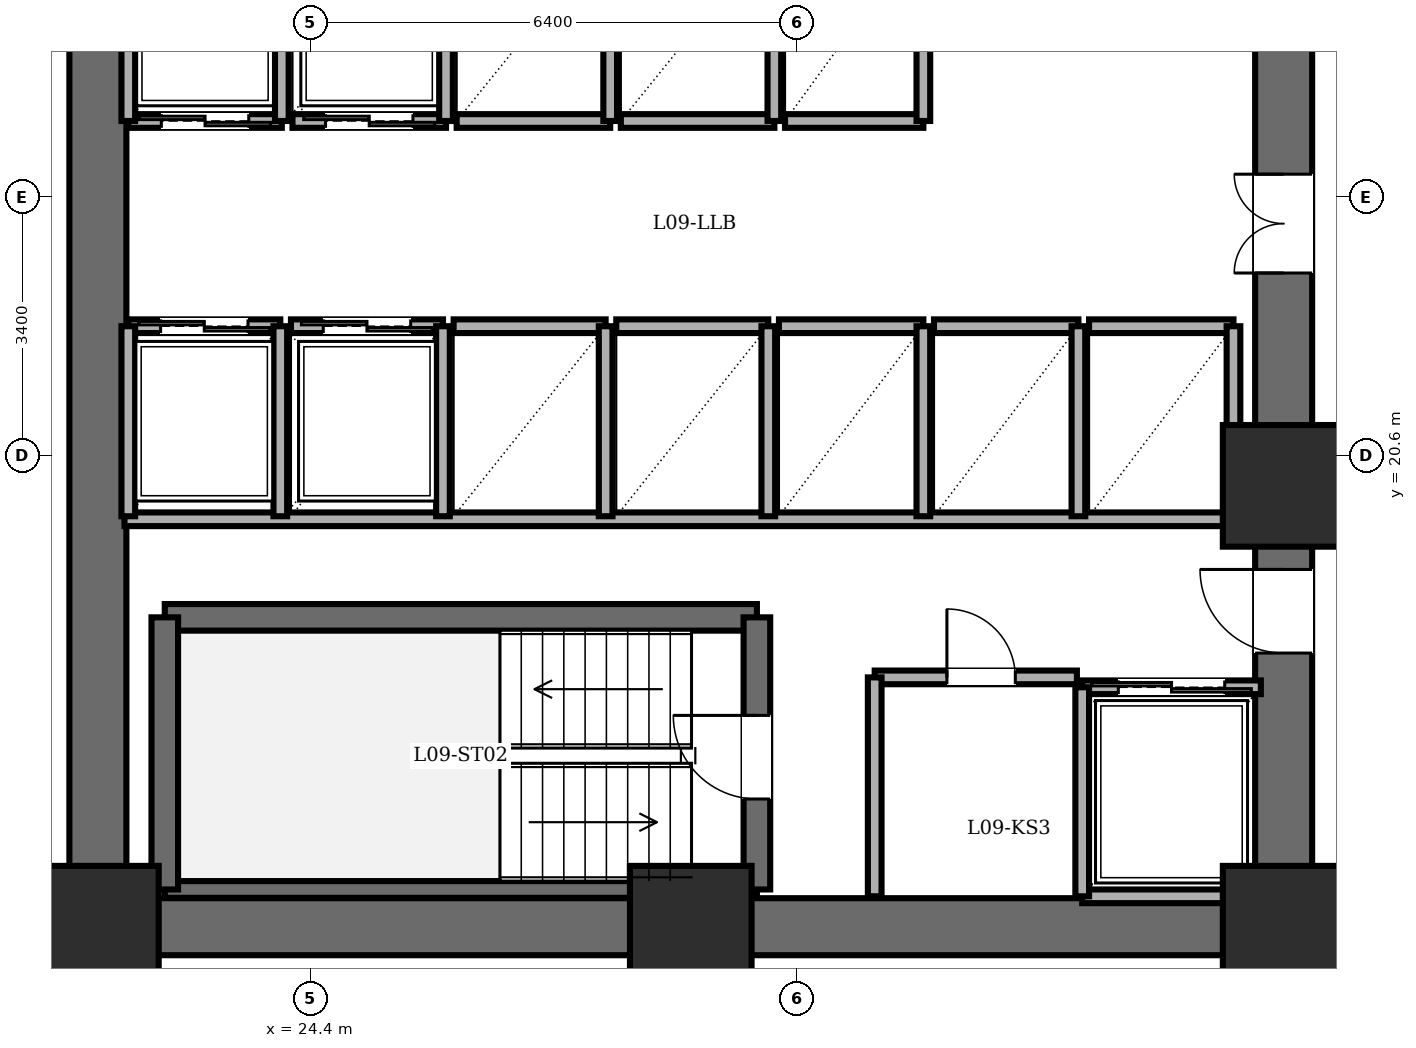
"""IFC4 building model, lengths in metres.
Left out: names, types, materials, properties, quantities, classifications, styles, units other than length and angle.
Written with IfcOpenShell. Run it as: python <this file> out.ifc"""

import sys

from ifc_helpers import new_model, si_unit, direction, frame, frame_2d, origin, origin_2d, place, context, subcontext, project, spatial, rectangle, extrude, element, fill, save


model = new_model("IFC4")
c1 = context("Model", 3, precision=1e-05, world=origin(), true_north=direction((0.0, 1.0)))
c2 = subcontext(c1, "Body", "Model", "MODEL_VIEW")
j1 = project(units=[si_unit("LENGTHUNIT", "METRE"), si_unit("PLANEANGLEUNIT", "RADIAN")], contexts=[c1])
p1 = place(None, origin())
s1 = spatial("IfcSite", under=j1, at=p1, CompositionType="ELEMENT")
p2 = place(p1, origin())
s2 = spatial("IfcBuilding", under=s1, at=p2, CompositionType="ELEMENT")
p3 = place(p2, frame((0.0, 0.0, 36.0)))
s3 = spatial("IfcBuildingStorey", under=s2, at=p3, CompositionType="ELEMENT", Elevation=36.0)
for number, where, z_axis, x_axis in (
    (1, (21.6, 14.4, 0.0), (0.0, 0.0, 1.0), (1.0, 0.0, 0.0)),
    (2, (29.4, 14.4, 0.0), (0.0, 0.0, 1.0), (1.0, 0.0, 0.0)),
    (3, (37.2, 14.4, 0.0), (0.0, 0.0, 1.0), (1.0, 0.0, 0.0)),
    (4, (37.2, 20.2, 0.0), (0.0, 0.0, 1.0), (1.0, 0.0, 0.0)),
):
    element("IfcColumn", number, at=place(p3, frame(where, z_axis=z_axis, x_axis=x_axis)), inside=s3, PredefinedType="COLUMN", context=c2, shape_type="SweptSolid", body=[
        extrude(rectangle(XDim=1.6, YDim=1.6, at=origin_2d()), origin(), (0.0, 0.0, 1.0), 3.6),
    ])
p4 = place(p3, frame((21.6, 14.4, 0.0), z_axis=(0.0, 0.0, 1.0), x_axis=(0.0, 1.0, 0.0)))
e5 = element("IfcWall", 5, at=p4, inside=s3, PredefinedType="SHEAR", context=c2, shape_type="SweptSolid", body=[
    extrude(rectangle(XDim=19.2, YDim=0.75, at=frame_2d((9.6, 0.0))), origin(), (0.0, 0.0, 1.0), 3.4),
])
p5 = place(p3, frame((37.2, 14.4, 0.0), z_axis=(0.0, 0.0, 1.0), x_axis=(-1.0, 0.0, 0.0)))
e6 = element("IfcWall", 6, at=p5, inside=s3, PredefinedType="SHEAR", context=c2, shape_type="SweptSolid", body=[
    extrude(rectangle(XDim=15.6, YDim=0.75, at=frame_2d((7.8, 0.0))), origin(), (0.0, 0.0, 1.0), 3.4),
])
p6 = place(p3, frame((37.2, 14.4, 0.0), z_axis=(0.0, 0.0, 1.0), x_axis=(0.0, 1.0, 0.0)))
e7 = element("IfcWall", 7, at=p6, inside=s3, PredefinedType="SHEAR", context=c2, shape_type="SweptSolid", body=[
    extrude(rectangle(XDim=19.2, YDim=0.75, at=frame_2d((9.6, 0.0))), origin(), (0.0, 0.0, 1.0), 3.4),
])
p7 = place(p6, frame((15.8, 0.0, 0.0)))
e8 = element("IfcOpeningElement", 8, at=p7, cuts=e7, PredefinedType="OPENING", context=c2, shape_type="SweptSolid", body=[
    extrude(rectangle(XDim=1.15, YDim=2.15, at=frame_2d((0.575, 1.075))), frame((0.0, 0.385, 0.0), z_axis=(0.0, -1.0, 0.0), x_axis=(1.0, 0.0, 0.0)), (0.0, 0.0, 1.0), 0.77),
])
p8 = place(p6, frame((3.6, 0.0, 0.0)))
e9 = element("IfcOpeningElement", 9, at=p8, cuts=e7, PredefinedType="OPENING", context=c2, shape_type="SweptSolid", body=[
    extrude(rectangle(XDim=1.1, YDim=2.15, at=frame_2d((0.55, 1.075))), frame((0.0, 0.385, 0.0), z_axis=(0.0, -1.0, 0.0), x_axis=(1.0, 0.0, 0.0)), (0.0, 0.0, 1.0), 0.77),
])
p9 = place(p6, frame((8.6, 0.0, 0.0)))
e10 = element("IfcOpeningElement", 10, at=p9, cuts=e7, PredefinedType="OPENING", context=c2, shape_type="SweptSolid", body=[
    extrude(rectangle(XDim=1.3, YDim=2.2, at=frame_2d((0.65, 1.1))), frame((0.0, 0.385, 0.0), z_axis=(0.0, -1.0, 0.0), x_axis=(1.0, 0.0, 0.0)), (0.0, 0.0, 1.0), 0.77),
])
p10 = place(p3, frame((22.48, 18.47, 0.0), z_axis=(0.0, 0.0, 1.0), x_axis=(1.0, 0.0, 0.0)))
e11 = element("IfcWall", 11, at=p10, inside=s3, PredefinedType="SOLIDWALL", context=c2, shape_type="SweptSolid", body=[
    extrude(rectangle(XDim=7.79, YDim=0.35, at=frame_2d((3.895, 0.0))), origin(), (0.0, 0.0, 1.0), 3.4),
])
p11 = place(p3, frame((22.48, 14.89, 0.0), z_axis=(0.0, 0.0, 1.0), x_axis=(1.0, 0.0, 0.0)))
e12 = element("IfcWall", 12, at=p11, inside=s3, PredefinedType="PARTITIONING", context=c2, shape_type="SweptSolid", body=[
    extrude(rectangle(XDim=7.79, YDim=0.22, at=frame_2d((3.895, 0.0))), origin(), (0.0, 0.0, 1.0), 3.4),
])
p12 = place(p3, frame((22.48, 14.89, 0.0), z_axis=(0.0, 0.0, 1.0), x_axis=(0.0, 1.0, 0.0)))
e13 = element("IfcWall", 13, at=p12, inside=s3, PredefinedType="SOLIDWALL", context=c2, shape_type="SweptSolid", body=[
    extrude(rectangle(XDim=3.58, YDim=0.35, at=frame_2d((1.79, 0.0))), origin(), (0.0, 0.0, 1.0), 3.4),
])
p13 = place(p3, frame((30.27, 14.89, 0.0), z_axis=(0.0, 0.0, 1.0), x_axis=(0.0, 1.0, 0.0)))
e14 = element("IfcWall", 14, at=p13, inside=s3, PredefinedType="SOLIDWALL", context=c2, shape_type="SweptSolid", body=[
    extrude(rectangle(XDim=3.58, YDim=0.35, at=frame_2d((1.79, 0.0))), origin(), (0.0, 0.0, 1.0), 3.4),
])
p14 = place(p13, frame((1.19, 0.0, 0.0)))
e15 = element("IfcOpeningElement", 15, at=p14, cuts=e14, PredefinedType="OPENING", context=c2, shape_type="SweptSolid", body=[
    extrude(rectangle(XDim=1.1, YDim=2.15, at=frame_2d((0.55, 1.075))), frame((0.0, 0.185, 0.0), z_axis=(0.0, -1.0, 0.0), x_axis=(1.0, 0.0, 0.0)), (0.0, 0.0, 1.0), 0.37),
])
p15 = place(p3, frame((21.95, 19.76, 0.0), z_axis=(0.0, 0.0, 1.0), x_axis=(1.0, 0.0, 0.0)))
e16 = element("IfcWall", 16, at=p15, inside=s3, PredefinedType="PARTITIONING", context=c2, shape_type="SweptSolid", body=[
    extrude(rectangle(XDim=14.87, YDim=0.18, at=frame_2d((7.435, 0.0))), origin(), (0.0, 0.0, 1.0), 3.4),
])
p16 = place(p3, frame((31.82, 17.68, 0.0), z_axis=(0.0, 0.0, 1.0), x_axis=(1.0, 0.0, 0.0)))
e17 = element("IfcWall", 17, at=p16, inside=s3, PredefinedType="PARTITIONING", context=c2, shape_type="SweptSolid", body=[
    extrude(rectangle(XDim=2.66, YDim=0.18, at=frame_2d((1.33, 0.0))), origin(), (0.0, 0.0, 1.0), 3.4),
])
p17 = place(p16, frame((0.95, 0.0, 0.0)))
e18 = element("IfcOpeningElement", 18, at=p17, cuts=e17, PredefinedType="OPENING", context=c2, shape_type="SweptSolid", body=[
    extrude(rectangle(XDim=0.9, YDim=2.05, at=frame_2d((0.45, 1.025))), frame((0.0, 0.1, 0.0), z_axis=(0.0, -1.0, 0.0), x_axis=(1.0, 0.0, 0.0)), (0.0, 0.0, 1.0), 0.2),
])
p18 = place(p3, frame((31.82, 14.8, 0.0), z_axis=(0.0, 0.0, 1.0), x_axis=(0.0, 1.0, 0.0)))
e19 = element("IfcWall", 19, at=p18, inside=s3, PredefinedType="PARTITIONING", context=c2, shape_type="SweptSolid", body=[
    extrude(rectangle(XDim=2.88, YDim=0.18, at=frame_2d((1.44, 0.0))), origin(), (0.0, 0.0, 1.0), 3.4),
])
p19 = place(p3, frame((34.55, 17.55, 0.0), z_axis=(0.0, 0.0, 1.0), x_axis=(1.0, 0.0, 0.0)))
e20 = element("IfcWall", 20, at=p19, inside=s3, PredefinedType="PARTITIONING", context=c2, shape_type="SweptSolid", body=[
    extrude(rectangle(XDim=2.35, YDim=0.18, at=frame_2d((1.175, 0.0))), origin(), (0.0, 0.0, 1.0), 3.4),
])
p20 = place(p19, frame((0.475, 0.0, 0.0)))
e21 = element("IfcOpeningElement", 21, at=p20, cuts=e20, PredefinedType="OPENING", context=c2, shape_type="SweptSolid", body=[
    extrude(rectangle(XDim=1.4, YDim=2.3, at=frame_2d((0.7, 1.15))), frame((0.0, 0.1, 0.0), z_axis=(0.0, -1.0, 0.0), x_axis=(1.0, 0.0, 0.0)), (0.0, 0.0, 1.0), 0.2),
])
p21 = place(p3, frame((36.9, 14.8, 0.0), z_axis=(0.0, 0.0, 1.0), x_axis=(-1.0, 0.0, 0.0)))
e22 = element("IfcWall", 22, at=p21, inside=s3, PredefinedType="PARTITIONING", context=c2, shape_type="SweptSolid", body=[
    extrude(rectangle(XDim=2.35, YDim=0.18, at=frame_2d((1.175, 0.0))), origin(), (0.0, 0.0, 1.0), 3.4),
])
p22 = place(p3, frame((34.55, 17.55, 0.0), z_axis=(0.0, 0.0, 1.0), x_axis=(0.0, -1.0, 0.0)))
e23 = element("IfcWall", 23, at=p22, inside=s3, PredefinedType="PARTITIONING", context=c2, shape_type="SweptSolid", body=[
    extrude(rectangle(XDim=2.75, YDim=0.18, at=frame_2d((1.375, 0.0))), origin(), (0.0, 0.0, 1.0), 3.4),
])
p23 = place(p3, frame((24.02, 25.0, 0.0), z_axis=(0.0, 0.0, 1.0), x_axis=(-1.0, 0.0, 0.0)))
e24 = element("IfcWall", 24, at=p23, inside=s3, PredefinedType="PARTITIONING", context=c2, shape_type="SweptSolid", body=[
    extrude(rectangle(XDim=2.02, YDim=0.18, at=frame_2d((1.01, 0.0))), origin(), (0.0, 0.0, 1.0), 3.4),
])
p24 = place(p23, frame((0.435, 0.0, 0.0)))
e25 = element("IfcOpeningElement", 25, at=p24, cuts=e24, PredefinedType="OPENING", context=c2, shape_type="SweptSolid", body=[
    extrude(rectangle(XDim=1.15, YDim=2.2, at=frame_2d((0.575, 1.1))), frame((0.0, 0.1, 0.0), z_axis=(0.0, -1.0, 0.0), x_axis=(1.0, 0.0, 0.0)), (0.0, 0.0, 1.0), 0.2),
])
for number, where, z_axis, x_axis in (
    (26, (24.02, 25.0, 0.0), (0.0, 0.0, 1.0), (0.0, 1.0, 0.0)),
    (27, (22.0, 27.5, 0.0), (0.0, 0.0, 1.0), (0.0, -1.0, 0.0)),
):
    element("IfcWall", number, at=place(p3, frame(where, z_axis=z_axis, x_axis=x_axis)), inside=s3, PredefinedType="PARTITIONING", context=c2, shape_type="SweptSolid", body=[
        extrude(rectangle(XDim=2.5, YDim=0.18, at=frame_2d((1.25, 0.0))), origin(), (0.0, 0.0, 1.0), 3.4),
    ])
p25 = place(p3, frame((26.18, 25.0, 0.0), z_axis=(0.0, 0.0, 1.0), x_axis=(-1.0, 0.0, 0.0)))
e28 = element("IfcWall", 28, at=p25, inside=s3, PredefinedType="PARTITIONING", context=c2, shape_type="SweptSolid", body=[
    extrude(rectangle(XDim=2.02, YDim=0.18, at=frame_2d((1.01, 0.0))), origin(), (0.0, 0.0, 1.0), 3.4),
])
p26 = place(p25, frame((0.435, 0.0, 0.0)))
e29 = element("IfcOpeningElement", 29, at=p26, cuts=e28, PredefinedType="OPENING", context=c2, shape_type="SweptSolid", body=[
    extrude(rectangle(XDim=1.15, YDim=2.2, at=frame_2d((0.575, 1.1))), frame((0.0, 0.1, 0.0), z_axis=(0.0, -1.0, 0.0), x_axis=(1.0, 0.0, 0.0)), (0.0, 0.0, 1.0), 0.2),
])
p27 = place(p3, frame((26.18, 25.0, 0.0), z_axis=(0.0, 0.0, 1.0), x_axis=(0.0, 1.0, 0.0)))
e30 = element("IfcWall", 30, at=p27, inside=s3, PredefinedType="PARTITIONING", context=c2, shape_type="SweptSolid", body=[
    extrude(rectangle(XDim=2.5, YDim=0.18, at=frame_2d((1.25, 0.0))), origin(), (0.0, 0.0, 1.0), 3.4),
])
p28 = place(p3, frame((22.0, 22.3, 0.0), z_axis=(0.0, 0.0, 1.0), x_axis=(1.0, 0.0, 0.0)))
e31 = element("IfcWall", 31, at=p28, inside=s3, PredefinedType="PARTITIONING", context=c2, shape_type="SweptSolid", body=[
    extrude(rectangle(XDim=2.0, YDim=0.18, at=frame_2d((1.0, 0.0))), origin(), (0.0, 0.0, 1.0), 3.4),
])
p29 = place(p28, frame((0.425, 0.0, 0.0)))
e32 = element("IfcOpeningElement", 32, at=p29, cuts=e31, PredefinedType="OPENING", context=c2, shape_type="SweptSolid", body=[
    extrude(rectangle(XDim=1.15, YDim=2.2, at=frame_2d((0.575, 1.1))), frame((0.0, 0.1, 0.0), z_axis=(0.0, -1.0, 0.0), x_axis=(1.0, 0.0, 0.0)), (0.0, 0.0, 1.0), 0.2),
])
for number, where, z_axis, x_axis in (
    (33, (24.0, 19.8, 0.0), (0.0, 0.0, 1.0), (0.0, 1.0, 0.0)),
    (34, (22.0, 22.3, 0.0), (0.0, 0.0, 1.0), (0.0, -1.0, 0.0)),
):
    element("IfcWall", number, at=place(p3, frame(where, z_axis=z_axis, x_axis=x_axis)), inside=s3, PredefinedType="PARTITIONING", context=c2, shape_type="SweptSolid", body=[
        extrude(rectangle(XDim=2.5, YDim=0.18, at=frame_2d((1.25, 0.0))), origin(), (0.0, 0.0, 1.0), 3.4),
    ])
p30 = place(p3, frame((24.14, 22.3, 0.0), z_axis=(0.0, 0.0, 1.0), x_axis=(1.0, 0.0, 0.0)))
e35 = element("IfcWall", 35, at=p30, inside=s3, PredefinedType="PARTITIONING", context=c2, shape_type="SweptSolid", body=[
    extrude(rectangle(XDim=2.0, YDim=0.18, at=frame_2d((1.0, 0.0))), origin(), (0.0, 0.0, 1.0), 3.4),
])
p31 = place(p30, frame((0.425, 0.0, 0.0)))
e36 = element("IfcOpeningElement", 36, at=p31, cuts=e35, PredefinedType="OPENING", context=c2, shape_type="SweptSolid", body=[
    extrude(rectangle(XDim=1.15, YDim=2.2, at=frame_2d((0.575, 1.1))), frame((0.0, 0.1, 0.0), z_axis=(0.0, -1.0, 0.0), x_axis=(1.0, 0.0, 0.0)), (0.0, 0.0, 1.0), 0.2),
])
p32 = place(p3, frame((26.14, 19.8, 0.0), z_axis=(0.0, 0.0, 1.0), x_axis=(0.0, 1.0, 0.0)))
e37 = element("IfcWall", 37, at=p32, inside=s3, PredefinedType="PARTITIONING", context=c2, shape_type="SweptSolid", body=[
    extrude(rectangle(XDim=2.5, YDim=0.18, at=frame_2d((1.25, 0.0))), origin(), (0.0, 0.0, 1.0), 3.4),
])
p33 = place(p3, frame((28.34, 25.0, 0.0), z_axis=(0.0, 0.0, 1.0), x_axis=(-1.0, 0.0, 0.0)))
e38 = element("IfcWall", 38, at=p33, inside=s3, PredefinedType="PARTITIONING", context=c2, shape_type="SweptSolid", body=[
    extrude(rectangle(XDim=2.02, YDim=0.18, at=frame_2d((1.01, 0.0))), origin(), (0.0, 0.0, 1.0), 3.4),
])
p34 = place(p3, frame((28.34, 25.0, 0.0), z_axis=(0.0, 0.0, 1.0), x_axis=(0.0, 1.0, 0.0)))
e39 = element("IfcWall", 39, at=p34, inside=s3, PredefinedType="PARTITIONING", context=c2, shape_type="SweptSolid", body=[
    extrude(rectangle(XDim=2.5, YDim=0.18, at=frame_2d((1.25, 0.0))), origin(), (0.0, 0.0, 1.0), 3.4),
])
p35 = place(p3, frame((30.5, 25.0, 0.0), z_axis=(0.0, 0.0, 1.0), x_axis=(-1.0, 0.0, 0.0)))
e40 = element("IfcWall", 40, at=p35, inside=s3, PredefinedType="PARTITIONING", context=c2, shape_type="SweptSolid", body=[
    extrude(rectangle(XDim=2.02, YDim=0.18, at=frame_2d((1.01, 0.0))), origin(), (0.0, 0.0, 1.0), 3.4),
])
p36 = place(p3, frame((30.5, 25.0, 0.0), z_axis=(0.0, 0.0, 1.0), x_axis=(0.0, 1.0, 0.0)))
e41 = element("IfcWall", 41, at=p36, inside=s3, PredefinedType="PARTITIONING", context=c2, shape_type="SweptSolid", body=[
    extrude(rectangle(XDim=2.5, YDim=0.18, at=frame_2d((1.25, 0.0))), origin(), (0.0, 0.0, 1.0), 3.4),
])
p37 = place(p3, frame((26.28, 22.3, 0.0), z_axis=(0.0, 0.0, 1.0), x_axis=(1.0, 0.0, 0.0)))
e42 = element("IfcWall", 42, at=p37, inside=s3, PredefinedType="PARTITIONING", context=c2, shape_type="SweptSolid", body=[
    extrude(rectangle(XDim=2.0, YDim=0.18, at=frame_2d((1.0, 0.0))), origin(), (0.0, 0.0, 1.0), 3.4),
])
p38 = place(p3, frame((28.28, 19.8, 0.0), z_axis=(0.0, 0.0, 1.0), x_axis=(0.0, 1.0, 0.0)))
e43 = element("IfcWall", 43, at=p38, inside=s3, PredefinedType="PARTITIONING", context=c2, shape_type="SweptSolid", body=[
    extrude(rectangle(XDim=2.5, YDim=0.18, at=frame_2d((1.25, 0.0))), origin(), (0.0, 0.0, 1.0), 3.4),
])
p39 = place(p3, frame((28.42, 22.3, 0.0), z_axis=(0.0, 0.0, 1.0), x_axis=(1.0, 0.0, 0.0)))
e44 = element("IfcWall", 44, at=p39, inside=s3, PredefinedType="PARTITIONING", context=c2, shape_type="SweptSolid", body=[
    extrude(rectangle(XDim=2.0, YDim=0.18, at=frame_2d((1.0, 0.0))), origin(), (0.0, 0.0, 1.0), 3.4),
])
p40 = place(p3, frame((30.42, 19.8, 0.0), z_axis=(0.0, 0.0, 1.0), x_axis=(0.0, 1.0, 0.0)))
e45 = element("IfcWall", 45, at=p40, inside=s3, PredefinedType="PARTITIONING", context=c2, shape_type="SweptSolid", body=[
    extrude(rectangle(XDim=2.5, YDim=0.18, at=frame_2d((1.25, 0.0))), origin(), (0.0, 0.0, 1.0), 3.4),
])
p41 = place(p3, frame((32.46, 25.0, 0.0), z_axis=(0.0, 0.0, 1.0), x_axis=(-1.0, 0.0, 0.0)))
e46 = element("IfcWall", 46, at=p41, inside=s3, PredefinedType="PARTITIONING", context=c2, shape_type="SweptSolid", body=[
    extrude(rectangle(XDim=1.82, YDim=0.18, at=frame_2d((0.91, 0.0))), origin(), (0.0, 0.0, 1.0), 3.4),
])
p42 = place(p3, frame((32.46, 25.0, 0.0), z_axis=(0.0, 0.0, 1.0), x_axis=(0.0, 1.0, 0.0)))
e47 = element("IfcWall", 47, at=p42, inside=s3, PredefinedType="PARTITIONING", context=c2, shape_type="SweptSolid", body=[
    extrude(rectangle(XDim=2.5, YDim=0.18, at=frame_2d((1.25, 0.0))), origin(), (0.0, 0.0, 1.0), 3.4),
])
p43 = place(p3, frame((30.56, 22.3, 0.0), z_axis=(0.0, 0.0, 1.0), x_axis=(1.0, 0.0, 0.0)))
e48 = element("IfcWall", 48, at=p43, inside=s3, PredefinedType="PARTITIONING", context=c2, shape_type="SweptSolid", body=[
    extrude(rectangle(XDim=1.9, YDim=0.18, at=frame_2d((0.95, 0.0))), origin(), (0.0, 0.0, 1.0), 3.4),
])
p44 = place(p3, frame((32.46, 19.8, 0.0), z_axis=(0.0, 0.0, 1.0), x_axis=(0.0, 1.0, 0.0)))
e49 = element("IfcWall", 49, at=p44, inside=s3, PredefinedType="PARTITIONING", context=c2, shape_type="SweptSolid", body=[
    extrude(rectangle(XDim=2.5, YDim=0.18, at=frame_2d((1.25, 0.0))), origin(), (0.0, 0.0, 1.0), 3.4),
])
p45 = place(p3, frame((32.6, 22.3, 0.0), z_axis=(0.0, 0.0, 1.0), x_axis=(1.0, 0.0, 0.0)))
e50 = element("IfcWall", 50, at=p45, inside=s3, PredefinedType="PARTITIONING", context=c2, shape_type="SweptSolid", body=[
    extrude(rectangle(XDim=1.9, YDim=0.18, at=frame_2d((0.95, 0.0))), origin(), (0.0, 0.0, 1.0), 3.4),
])
p46 = place(p3, frame((34.5, 19.8, 0.0), z_axis=(0.0, 0.0, 1.0), x_axis=(0.0, 1.0, 0.0)))
e51 = element("IfcWall", 51, at=p46, inside=s3, PredefinedType="PARTITIONING", context=c2, shape_type="SweptSolid", body=[
    extrude(rectangle(XDim=2.5, YDim=0.18, at=frame_2d((1.25, 0.0))), origin(), (0.0, 0.0, 1.0), 3.4),
])
p47 = place(p3, frame((34.64, 22.3, 0.0), z_axis=(0.0, 0.0, 1.0), x_axis=(1.0, 0.0, 0.0)))
e52 = element("IfcWall", 52, at=p47, inside=s3, PredefinedType="PARTITIONING", context=c2, shape_type="SweptSolid", body=[
    extrude(rectangle(XDim=1.9, YDim=0.18, at=frame_2d((0.95, 0.0))), origin(), (0.0, 0.0, 1.0), 3.4),
])
p48 = place(p3, frame((36.54, 19.8, 0.0), z_axis=(0.0, 0.0, 1.0), x_axis=(0.0, 1.0, 0.0)))
e53 = element("IfcWall", 53, at=p48, inside=s3, PredefinedType="PARTITIONING", context=c2, shape_type="SweptSolid", body=[
    extrude(rectangle(XDim=2.5, YDim=0.18, at=frame_2d((1.25, 0.0))), origin(), (0.0, 0.0, 1.0), 3.4),
])
p49 = place(p14, origin())
e54 = element("IfcDoor", 54, at=p49, inside=s3, OperationType="SINGLE_SWING_RIGHT", PredefinedType="DOOR", context=c2, shape_type="SweptSolid", body=[
    extrude(rectangle(XDim=1.1, YDim=2.15, at=frame_2d((0.55, 1.075))), frame((0.0, 0.025, 0.0), z_axis=(0.0, -1.0, 0.0), x_axis=(1.0, 0.0, 0.0)), (0.0, 0.0, 1.0), 0.05),
])
fill(e15, e54)
p50 = place(p8, origin())
e55 = element("IfcDoor", 55, at=p50, inside=s3, OperationType="SINGLE_SWING_RIGHT", PredefinedType="DOOR", context=c2, shape_type="SweptSolid", body=[
    extrude(rectangle(XDim=1.1, YDim=2.15, at=frame_2d((0.55, 1.075))), frame((0.0, 0.025, 0.0), z_axis=(0.0, -1.0, 0.0), x_axis=(1.0, 0.0, 0.0)), (0.0, 0.0, 1.0), 0.05),
])
fill(e9, e55)
p51 = place(p17, origin())
e56 = element("IfcDoor", 56, at=p51, inside=s3, OperationType="SINGLE_SWING_LEFT", PredefinedType="DOOR", context=c2, shape_type="SweptSolid", body=[
    extrude(rectangle(XDim=0.9, YDim=2.05, at=frame_2d((0.45, 1.025))), frame((0.0, 0.025, 0.0), z_axis=(0.0, -1.0, 0.0), x_axis=(1.0, 0.0, 0.0)), (0.0, 0.0, 1.0), 0.05),
])
fill(e18, e56)
p52 = place(p20, origin())
e57 = element("IfcDoor", 57, at=p52, inside=s3, OperationType="DOUBLE_DOOR_SLIDING", PredefinedType="DOOR", context=c2, shape_type="SweptSolid", body=[
    extrude(rectangle(XDim=1.4, YDim=2.3, at=frame_2d((0.7, 1.15))), frame((0.0, 0.025, 0.0), z_axis=(0.0, -1.0, 0.0), x_axis=(1.0, 0.0, 0.0)), (0.0, 0.0, 1.0), 0.05),
])
fill(e21, e57)
p53 = place(p24, origin())
e58 = element("IfcDoor", 58, at=p53, inside=s3, OperationType="DOUBLE_DOOR_SLIDING", PredefinedType="DOOR", context=c2, shape_type="SweptSolid", body=[
    extrude(rectangle(XDim=1.15, YDim=2.2, at=frame_2d((0.575, 1.1))), frame((0.0, 0.025, 0.0), z_axis=(0.0, -1.0, 0.0), x_axis=(1.0, 0.0, 0.0)), (0.0, 0.0, 1.0), 0.05),
])
fill(e25, e58)
p54 = place(p26, origin())
e59 = element("IfcDoor", 59, at=p54, inside=s3, OperationType="DOUBLE_DOOR_SLIDING", PredefinedType="DOOR", context=c2, shape_type="SweptSolid", body=[
    extrude(rectangle(XDim=1.15, YDim=2.2, at=frame_2d((0.575, 1.1))), frame((0.0, 0.025, 0.0), z_axis=(0.0, -1.0, 0.0), x_axis=(1.0, 0.0, 0.0)), (0.0, 0.0, 1.0), 0.05),
])
fill(e29, e59)
p55 = place(p29, origin())
e60 = element("IfcDoor", 60, at=p55, inside=s3, OperationType="DOUBLE_DOOR_SLIDING", PredefinedType="DOOR", context=c2, shape_type="SweptSolid", body=[
    extrude(rectangle(XDim=1.15, YDim=2.2, at=frame_2d((0.575, 1.1))), frame((0.0, 0.025, 0.0), z_axis=(0.0, -1.0, 0.0), x_axis=(1.0, 0.0, 0.0)), (0.0, 0.0, 1.0), 0.05),
])
fill(e32, e60)
p56 = place(p31, origin())
e61 = element("IfcDoor", 61, at=p56, inside=s3, OperationType="DOUBLE_DOOR_SLIDING", PredefinedType="DOOR", context=c2, shape_type="SweptSolid", body=[
    extrude(rectangle(XDim=1.15, YDim=2.2, at=frame_2d((0.575, 1.1))), frame((0.0, 0.025, 0.0), z_axis=(0.0, -1.0, 0.0), x_axis=(1.0, 0.0, 0.0)), (0.0, 0.0, 1.0), 0.05),
])
fill(e36, e61)
p57 = place(p9, origin())
e62 = element("IfcDoor", 62, at=p57, inside=s3, OperationType="DOUBLE_DOOR_SINGLE_SWING", PredefinedType="DOOR", context=c2, shape_type="SweptSolid", body=[
    extrude(rectangle(XDim=1.3, YDim=2.2, at=frame_2d((0.65, 1.1))), frame((0.0, 0.025, 0.0), z_axis=(0.0, -1.0, 0.0), x_axis=(1.0, 0.0, 0.0)), (0.0, 0.0, 1.0), 0.05),
])
fill(e10, e62)
save(model, sys.argv[1])
